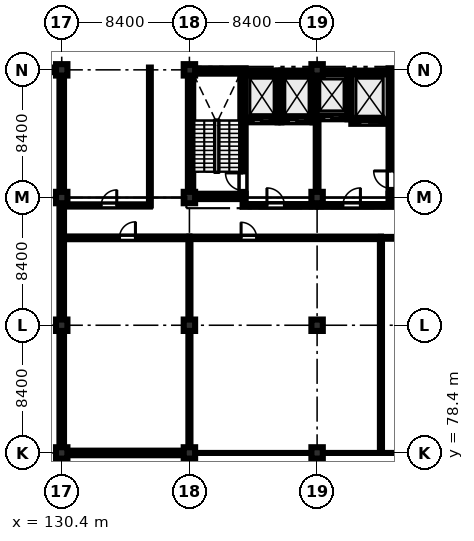
"""IFC4 building model, lengths in metres.
Left out: names, types, materials, properties, quantities, classifications, styles, units other than length and angle.
Written with IfcOpenShell. Run it as: python <this file> out.ifc"""

import sys

from ifc_helpers import new_model, si_unit, direction, frame, frame_2d, origin, origin_2d, place, context, subcontext, project, spatial, rectangle, extrude, element, fill, save


model = new_model("IFC4")
c1 = context("Model", 3, precision=1e-05, world=origin(), true_north=direction((0.0, 1.0)))
c2 = subcontext(c1, "Body", "Model", "MODEL_VIEW")
j1 = project(units=[si_unit("LENGTHUNIT", "METRE"), si_unit("PLANEANGLEUNIT", "RADIAN")], contexts=[c1])
p1 = place(None, origin())
s1 = spatial("IfcSite", under=j1, at=p1, CompositionType="ELEMENT")
p2 = place(p1, origin())
s2 = spatial("IfcBuilding", under=s1, at=p2, CompositionType="ELEMENT")
p3 = place(p2, frame((0.0, 0.0, 40.2)))
s3 = spatial("IfcBuildingStorey", under=s2, at=p3, CompositionType="ELEMENT", Elevation=40.2)
for number, where, z_axis, x_axis in (
    (1, (130.4, 78.4, 0.0), (0.0, 0.0, 1.0), (1.0, 0.0, 0.0)),
    (2, (130.4, 86.8, 0.0), (0.0, 0.0, 1.0), (1.0, 0.0, 0.0)),
    (3, (130.4, 95.2, 0.0), (0.0, 0.0, 1.0), (1.0, 0.0, 0.0)),
    (4, (130.4, 103.6, 0.0), (0.0, 0.0, 1.0), (1.0, 0.0, 0.0)),
    (5, (138.8, 78.4, 0.0), (0.0, 0.0, 1.0), (1.0, 0.0, 0.0)),
    (6, (138.8, 86.8, 0.0), (0.0, 0.0, 1.0), (1.0, 0.0, 0.0)),
    (7, (138.8, 95.2, 0.0), (0.0, 0.0, 1.0), (1.0, 0.0, 0.0)),
    (8, (138.8, 103.6, 0.0), (0.0, 0.0, 1.0), (1.0, 0.0, 0.0)),
    (9, (147.2, 78.4, 0.0), (0.0, 0.0, 1.0), (1.0, 0.0, 0.0)),
    (10, (147.2, 86.8, 0.0), (0.0, 0.0, 1.0), (1.0, 0.0, 0.0)),
    (11, (147.2, 95.2, 0.0), (0.0, 0.0, 1.0), (1.0, 0.0, 0.0)),
    (12, (147.2, 103.6, 0.0), (0.0, 0.0, 1.0), (1.0, 0.0, 0.0)),
):
    element("IfcColumn", number, at=place(p3, frame(where, z_axis=z_axis, x_axis=x_axis)), inside=s3, PredefinedType="COLUMN", context=c2, shape_type="SweptSolid", body=[
        extrude(rectangle(XDim=0.75, YDim=0.75, at=origin_2d()), origin(), (0.0, 0.0, 1.0), 4.0),
    ])
for number, where, z_axis, x_axis in (
    (13, (138.7, 95.275, 0.0), (0.0, 0.0, 1.0), (1.0, 0.0, 0.0)),
    (14, (138.7, 103.525, 0.0), (0.0, 0.0, 1.0), (1.0, 0.0, 0.0)),
):
    element("IfcWall", number, at=place(p3, frame(where, z_axis=z_axis, x_axis=x_axis)), inside=s3, PredefinedType="SHEAR", context=c2, shape_type="SweptSolid", body=[
        extrude(rectangle(XDim=3.8, YDim=0.35, at=frame_2d((1.9, 0.0))), origin(), (0.0, 0.0, 1.0), 4.0),
    ])
p4 = place(p3, frame((138.875, 95.45, 0.0), z_axis=(0.0, 0.0, 1.0), x_axis=(0.0, 1.0, 0.0)))
e15 = element("IfcWall", 15, at=p4, inside=s3, PredefinedType="SHEAR", context=c2, shape_type="SweptSolid", body=[
    extrude(rectangle(XDim=7.9, YDim=0.35, at=frame_2d((3.95, 0.0))), origin(), (0.0, 0.0, 1.0), 4.0),
])
p5 = place(p3, frame((142.325, 95.45, 0.0), z_axis=(0.0, 0.0, 1.0), x_axis=(0.0, 1.0, 0.0)))
e16 = element("IfcWall", 16, at=p5, inside=s3, PredefinedType="SHEAR", context=c2, shape_type="SweptSolid", body=[
    extrude(rectangle(XDim=7.9, YDim=0.35, at=frame_2d((3.95, 0.0))), origin(), (0.0, 0.0, 1.0), 4.0),
])
p6 = place(p5, frame((0.22, 0.0, 0.0)))
e17 = element("IfcOpeningElement", 17, at=p6, cuts=e16, PredefinedType="OPENING", context=c2, shape_type="SweptSolid", body=[
    extrude(rectangle(XDim=1.15, YDim=2.15, at=frame_2d((0.575, 1.075))), frame((0.0, 0.185, 0.0), z_axis=(0.0, -1.0, 0.0), x_axis=(1.0, 0.0, 0.0)), (0.0, 0.0, 1.0), 0.37),
])
for number, where, z_axis, x_axis in (
    (18, (151.9, 95.275, 0.0), (0.0, 0.0, 1.0), (1.0, 0.0, 0.0)),
    (19, (151.9, 103.525, 0.0), (0.0, 0.0, 1.0), (1.0, 0.0, 0.0)),
):
    element("IfcWall", number, at=place(p3, frame(where, z_axis=z_axis, x_axis=x_axis)), inside=s3, PredefinedType="SHEAR", context=c2, shape_type="SweptSolid", body=[
        extrude(rectangle(XDim=3.8, YDim=0.35, at=frame_2d((1.9, 0.0))), origin(), (0.0, 0.0, 1.0), 4.0),
    ])
p7 = place(p3, frame((152.075, 95.45, 0.0), z_axis=(0.0, 0.0, 1.0), x_axis=(0.0, 1.0, 0.0)))
e20 = element("IfcWall", 20, at=p7, inside=s3, PredefinedType="SHEAR", context=c2, shape_type="SweptSolid", body=[
    extrude(rectangle(XDim=7.9, YDim=0.35, at=frame_2d((3.95, 0.0))), origin(), (0.0, 0.0, 1.0), 4.0),
])
p8 = place(p7, frame((0.35, 0.0, 0.0)))
e21 = element("IfcOpeningElement", 21, at=p8, cuts=e20, PredefinedType="OPENING", context=c2, shape_type="SweptSolid", body=[
    extrude(rectangle(XDim=1.15, YDim=2.15, at=frame_2d((0.575, 1.075))), frame((0.0, 0.185, 0.0), z_axis=(0.0, -1.0, 0.0), x_axis=(1.0, 0.0, 0.0)), (0.0, 0.0, 1.0), 0.37),
])
p9 = place(p3, frame((142.5, 100.275, 0.0), z_axis=(0.0, 0.0, 1.0), x_axis=(1.0, 0.0, 0.0)))
e22 = element("IfcWall", 22, at=p9, inside=s3, PredefinedType="SHEAR", context=c2, shape_type="SweptSolid", body=[
    extrude(rectangle(XDim=2.1, YDim=0.25, at=frame_2d((1.05, 0.0))), origin(), (0.0, 0.0, 1.0), 4.0),
])
p10 = place(p9, frame((0.5, 0.0, 0.0)))
e23 = element("IfcOpeningElement", 23, at=p10, cuts=e22, PredefinedType="OPENING", context=c2, shape_type="SweptSolid", body=[
    extrude(rectangle(XDim=1.1, YDim=2.15, at=frame_2d((0.55, 1.075))), frame((0.0, 0.135, 0.0), z_axis=(0.0, -1.0, 0.0), x_axis=(1.0, 0.0, 0.0)), (0.0, 0.0, 1.0), 0.27),
])
p11 = place(p3, frame((142.5, 103.425, 0.0), z_axis=(0.0, 0.0, 1.0), x_axis=(1.0, 0.0, 0.0)))
e24 = element("IfcWall", 24, at=p11, inside=s3, PredefinedType="SHEAR", context=c2, shape_type="SweptSolid", body=[
    extrude(rectangle(XDim=2.1, YDim=0.25, at=frame_2d((1.05, 0.0))), origin(), (0.0, 0.0, 1.0), 4.0),
])
p12 = place(p3, frame((144.725, 100.15, 0.0), z_axis=(0.0, 0.0, 1.0), x_axis=(0.0, 1.0, 0.0)))
e25 = element("IfcWall", 25, at=p12, inside=s3, PredefinedType="SHEAR", context=c2, shape_type="SweptSolid", body=[
    extrude(rectangle(XDim=3.4, YDim=0.25, at=frame_2d((1.7, 0.0))), origin(), (0.0, 0.0, 1.0), 4.0),
])
p13 = place(p3, frame((144.85, 100.275, 0.0), z_axis=(0.0, 0.0, 1.0), x_axis=(1.0, 0.0, 0.0)))
e26 = element("IfcWall", 26, at=p13, inside=s3, PredefinedType="SHEAR", context=c2, shape_type="SweptSolid", body=[
    extrude(rectangle(XDim=2.05, YDim=0.25, at=frame_2d((1.025, 0.0))), origin(), (0.0, 0.0, 1.0), 4.0),
])
p14 = place(p13, frame((0.465, 0.0, 0.0)))
e27 = element("IfcOpeningElement", 27, at=p14, cuts=e26, PredefinedType="OPENING", context=c2, shape_type="SweptSolid", body=[
    extrude(rectangle(XDim=1.12, YDim=2.15, at=frame_2d((0.56, 1.075))), frame((0.0, 0.135, 0.0), z_axis=(0.0, -1.0, 0.0), x_axis=(1.0, 0.0, 0.0)), (0.0, 0.0, 1.0), 0.27),
])
p15 = place(p3, frame((144.85, 103.425, 0.0), z_axis=(0.0, 0.0, 1.0), x_axis=(1.0, 0.0, 0.0)))
e28 = element("IfcWall", 28, at=p15, inside=s3, PredefinedType="SHEAR", context=c2, shape_type="SweptSolid", body=[
    extrude(rectangle(XDim=2.05, YDim=0.25, at=frame_2d((1.025, 0.0))), origin(), (0.0, 0.0, 1.0), 4.0),
])
p16 = place(p3, frame((147.025, 100.15, 0.0), z_axis=(0.0, 0.0, 1.0), x_axis=(0.0, 1.0, 0.0)))
e29 = element("IfcWall", 29, at=p16, inside=s3, PredefinedType="SHEAR", context=c2, shape_type="SweptSolid", body=[
    extrude(rectangle(XDim=3.4, YDim=0.25, at=frame_2d((1.7, 0.0))), origin(), (0.0, 0.0, 1.0), 4.0),
])
p17 = place(p3, frame((147.15, 100.475, 0.0), z_axis=(0.0, 0.0, 1.0), x_axis=(1.0, 0.0, 0.0)))
e30 = element("IfcWall", 30, at=p17, inside=s3, PredefinedType="SHEAR", context=c2, shape_type="SweptSolid", body=[
    extrude(rectangle(XDim=2.05, YDim=0.25, at=frame_2d((1.025, 0.0))), origin(), (0.0, 0.0, 1.0), 4.0),
])
p18 = place(p17, frame((0.495, 0.0, 0.0)))
e31 = element("IfcOpeningElement", 31, at=p18, cuts=e30, PredefinedType="OPENING", context=c2, shape_type="SweptSolid", body=[
    extrude(rectangle(XDim=1.06, YDim=2.15, at=frame_2d((0.53, 1.075))), frame((0.0, 0.135, 0.0), z_axis=(0.0, -1.0, 0.0), x_axis=(1.0, 0.0, 0.0)), (0.0, 0.0, 1.0), 0.27),
])
p19 = place(p3, frame((147.15, 103.425, 0.0), z_axis=(0.0, 0.0, 1.0), x_axis=(1.0, 0.0, 0.0)))
e32 = element("IfcWall", 32, at=p19, inside=s3, PredefinedType="SHEAR", context=c2, shape_type="SweptSolid", body=[
    extrude(rectangle(XDim=2.05, YDim=0.25, at=frame_2d((1.025, 0.0))), origin(), (0.0, 0.0, 1.0), 4.0),
])
p20 = place(p3, frame((149.325, 100.35, 0.0), z_axis=(0.0, 0.0, 1.0), x_axis=(0.0, 1.0, 0.0)))
e33 = element("IfcWall", 33, at=p20, inside=s3, PredefinedType="SHEAR", context=c2, shape_type="SweptSolid", body=[
    extrude(rectangle(XDim=3.2, YDim=0.25, at=frame_2d((1.6, 0.0))), origin(), (0.0, 0.0, 1.0), 4.0),
])
p21 = place(p3, frame((149.45, 100.175, 0.0), z_axis=(0.0, 0.0, 1.0), x_axis=(1.0, 0.0, 0.0)))
e34 = element("IfcWall", 34, at=p21, inside=s3, PredefinedType="SHEAR", context=c2, shape_type="SweptSolid", body=[
    extrude(rectangle(XDim=2.45, YDim=0.25, at=frame_2d((1.225, 0.0))), origin(), (0.0, 0.0, 1.0), 4.0),
])
p22 = place(p21, frame((0.575, 0.0, 0.0)))
e35 = element("IfcOpeningElement", 35, at=p22, cuts=e34, PredefinedType="OPENING", context=c2, shape_type="SweptSolid", body=[
    extrude(rectangle(XDim=1.3, YDim=2.25, at=frame_2d((0.65, 1.125))), frame((0.0, 0.135, 0.0), z_axis=(0.0, -1.0, 0.0), x_axis=(1.0, 0.0, 0.0)), (0.0, 0.0, 1.0), 0.27),
])
p23 = place(p3, frame((149.45, 103.425, 0.0), z_axis=(0.0, 0.0, 1.0), x_axis=(1.0, 0.0, 0.0)))
e36 = element("IfcWall", 36, at=p23, inside=s3, PredefinedType="SHEAR", context=c2, shape_type="SweptSolid", body=[
    extrude(rectangle(XDim=2.45, YDim=0.25, at=frame_2d((1.225, 0.0))), origin(), (0.0, 0.0, 1.0), 4.0),
])
p24 = place(p3, frame((138.425, 78.4, 0.0), z_axis=(0.0, 0.0, 1.0), x_axis=(-1.0, 0.0, 0.0)))
e37 = element("IfcWall", 37, at=p24, inside=s3, PredefinedType="STANDARD", context=c2, shape_type="SweptSolid", body=[
    extrude(rectangle(XDim=7.65, YDim=0.3, at=frame_2d((3.825, 0.0))), origin(), (0.0, 0.0, 1.0), 4.0),
])
p25 = place(p24, frame((1.15, 0.0, 0.95)))
e38 = element("IfcOpeningElement", 38, at=p25, cuts=e37, PredefinedType="OPENING", context=c2, shape_type="SweptSolid", body=[
    extrude(rectangle(XDim=2.25, YDim=1.95, at=frame_2d((1.125, 0.975))), frame((0.0, 0.16, 0.0), z_axis=(0.0, -1.0, 0.0), x_axis=(1.0, 0.0, 0.0)), (0.0, 0.0, 1.0), 0.32),
])
p26 = place(p3, frame((130.4, 78.775, 0.0), z_axis=(0.0, 0.0, 1.0), x_axis=(0.0, 1.0, 0.0)))
e39 = element("IfcWall", 39, at=p26, inside=s3, PredefinedType="STANDARD", context=c2, shape_type="SweptSolid", body=[
    extrude(rectangle(XDim=7.65, YDim=0.3, at=frame_2d((3.825, 0.0))), origin(), (0.0, 0.0, 1.0), 4.0),
])
p27 = place(p26, frame((2.4, 0.0, 0.95)))
e40 = element("IfcOpeningElement", 40, at=p27, cuts=e39, PredefinedType="OPENING", context=c2, shape_type="SweptSolid", body=[
    extrude(rectangle(XDim=1.5, YDim=1.8, at=frame_2d((0.75, 0.9))), frame((0.0, 0.16, 0.0), z_axis=(0.0, -1.0, 0.0), x_axis=(1.0, 0.0, 0.0)), (0.0, 0.0, 1.0), 0.32),
])
p28 = place(p3, frame((130.4, 87.175, 0.0), z_axis=(0.0, 0.0, 1.0), x_axis=(0.0, 1.0, 0.0)))
e41 = element("IfcWall", 41, at=p28, inside=s3, PredefinedType="STANDARD", context=c2, shape_type="SweptSolid", body=[
    extrude(rectangle(XDim=7.65, YDim=0.3, at=frame_2d((3.825, 0.0))), origin(), (0.0, 0.0, 1.0), 3.3),
])
p29 = place(p28, frame((2.4, 0.0, 0.95)))
e42 = element("IfcOpeningElement", 42, at=p29, cuts=e41, PredefinedType="OPENING", context=c2, shape_type="SweptSolid", body=[
    extrude(rectangle(XDim=1.5, YDim=1.8, at=frame_2d((0.75, 0.9))), frame((0.0, 0.16, 0.0), z_axis=(0.0, -1.0, 0.0), x_axis=(1.0, 0.0, 0.0)), (0.0, 0.0, 1.0), 0.32),
])
p30 = place(p3, frame((130.4, 95.575, 0.0), z_axis=(0.0, 0.0, 1.0), x_axis=(0.0, 1.0, 0.0)))
e43 = element("IfcWall", 43, at=p30, inside=s3, PredefinedType="STANDARD", context=c2, shape_type="SweptSolid", body=[
    extrude(rectangle(XDim=7.65, YDim=0.3, at=frame_2d((3.825, 0.0))), origin(), (0.0, 0.0, 1.0), 3.3),
])
p31 = place(p30, frame((2.4, 0.0, 1.0)))
e44 = element("IfcOpeningElement", 44, at=p31, cuts=e43, PredefinedType="OPENING", context=c2, shape_type="SweptSolid", body=[
    extrude(rectangle(XDim=1.8, YDim=1.8, at=frame_2d((0.9, 0.9))), frame((0.0, 0.16, 0.0), z_axis=(0.0, -1.0, 0.0), x_axis=(1.0, 0.0, 0.0)), (0.0, 0.0, 1.0), 0.32),
])
p32 = place(p3, frame((130.025, 103.6, 0.0), z_axis=(0.0, 0.0, 1.0), x_axis=(-1.0, 0.0, 0.0)))
e45 = element("IfcWall", 45, at=p32, inside=s3, PredefinedType="STANDARD", context=c2, shape_type="SweptSolid", body=[
    extrude(rectangle(XDim=7.65, YDim=0.3, at=frame_2d((3.825, 0.0))), origin(), (0.0, 0.0, 1.0), 3.3),
])
p33 = place(p3, frame((142.3, 94.68, 0.0), z_axis=(0.0, 0.0, 1.0), x_axis=(1.0, 0.0, 0.0)))
e46 = element("IfcWall", 46, at=p33, inside=s3, PredefinedType="STANDARD", context=c2, shape_type="SweptSolid", body=[
    extrude(rectangle(XDim=4.8, YDim=0.18, at=frame_2d((2.4, 0.0))), origin(), (0.0, 0.0, 1.0), 4.0),
])
p34 = place(p33, frame((1.6, 0.0, 0.0)))
e47 = element("IfcOpeningElement", 47, at=p34, cuts=e46, PredefinedType="OPENING", context=c2, shape_type="SweptSolid", body=[
    extrude(rectangle(XDim=1.15, YDim=2.15, at=frame_2d((0.575, 1.075))), frame((0.0, 0.1, 0.0), z_axis=(0.0, -1.0, 0.0), x_axis=(1.0, 0.0, 0.0)), (0.0, 0.0, 1.0), 0.2),
])
p35 = place(p3, frame((147.3, 94.68, 0.0), z_axis=(0.0, 0.0, 1.0), x_axis=(1.0, 0.0, 0.0)))
e48 = element("IfcWall", 48, at=p35, inside=s3, PredefinedType="STANDARD", context=c2, shape_type="SweptSolid", body=[
    extrude(rectangle(XDim=4.85, YDim=0.18, at=frame_2d((2.425, 0.0))), origin(), (0.0, 0.0, 1.0), 4.0),
])
p36 = place(p35, frame((1.6, 0.0, 0.0)))
e49 = element("IfcOpeningElement", 49, at=p36, cuts=e48, PredefinedType="OPENING", context=c2, shape_type="SweptSolid", body=[
    extrude(rectangle(XDim=1.15, YDim=2.15, at=frame_2d((0.575, 1.075))), frame((0.0, 0.1, 0.0), z_axis=(0.0, -1.0, 0.0), x_axis=(1.0, 0.0, 0.0)), (0.0, 0.0, 1.0), 0.2),
])
p37 = place(p3, frame((147.2, 95.75, 0.0), z_axis=(0.0, 0.0, 1.0), x_axis=(0.0, 1.0, 0.0)))
e50 = element("IfcWall", 50, at=p37, inside=s3, PredefinedType="STANDARD", context=c2, shape_type="SweptSolid", body=[
    extrude(rectangle(XDim=4.5, YDim=0.18, at=frame_2d((2.25, 0.0))), origin(), (0.0, 0.0, 1.0), 3.3),
])
p38 = place(p3, frame((136.2, 94.68, 0.0), z_axis=(0.0, 0.0, 1.0), x_axis=(0.0, 1.0, 0.0)))
e51 = element("IfcWall", 51, at=p38, inside=s3, PredefinedType="PARTITIONING", context=c2, shape_type="SweptSolid", body=[
    extrude(rectangle(XDim=9.07, YDim=0.12, at=frame_2d((4.535, 0.0))), origin(), (0.0, 0.0, 1.0), 4.0),
])
p39 = place(p3, frame((130.8, 94.68, 0.0), z_axis=(0.0, 0.0, 1.0), x_axis=(1.0, 0.0, 0.0)))
e52 = element("IfcWall", 52, at=p39, inside=s3, PredefinedType="PARTITIONING", context=c2, shape_type="SweptSolid", body=[
    extrude(rectangle(XDim=5.4, YDim=0.145, at=frame_2d((2.7, 0.0))), origin(), (0.0, 0.0, 1.0), 4.0),
])
p40 = place(p39, frame((2.2, 0.0, 0.0)))
e53 = element("IfcOpeningElement", 53, at=p40, cuts=e52, PredefinedType="OPENING", context=c2, shape_type="SweptSolid", body=[
    extrude(rectangle(XDim=1.02, YDim=2.15, at=frame_2d((0.51, 1.075))), frame((0.0, 0.083, 0.0), z_axis=(0.0, -1.0, 0.0), x_axis=(1.0, 0.0, 0.0)), (0.0, 0.0, 1.0), 0.165),
])
p41 = place(p3, frame((130.55, 92.55, 0.0), z_axis=(0.0, 0.0, 1.0), x_axis=(1.0, 0.0, 0.0)))
e54 = element("IfcWall", 54, at=p41, inside=s3, PredefinedType="STANDARD", context=c2, shape_type="SweptSolid", body=[
    extrude(rectangle(XDim=8.25, YDim=0.18, at=frame_2d((4.125, 0.0))), origin(), (0.0, 0.0, 1.0), 4.0),
])
p42 = place(p41, frame((3.65, 0.0, 0.0)))
e55 = element("IfcOpeningElement", 55, at=p42, cuts=e54, PredefinedType="OPENING", context=c2, shape_type="SweptSolid", body=[
    extrude(rectangle(XDim=1.05, YDim=2.15, at=frame_2d((0.525, 1.075))), frame((0.0, 0.1, 0.0), z_axis=(0.0, -1.0, 0.0), x_axis=(1.0, 0.0, 0.0)), (0.0, 0.0, 1.0), 0.2),
])
p43 = place(p3, frame((138.8, 92.55, 0.0), z_axis=(0.0, 0.0, 1.0), x_axis=(1.0, 0.0, 0.0)))
e56 = element("IfcWall", 56, at=p43, inside=s3, PredefinedType="PARTITIONING", context=c2, shape_type="SweptSolid", body=[
    extrude(rectangle(XDim=12.6, YDim=0.165, at=frame_2d((6.3, 0.0))), origin(), (0.0, 0.0, 1.0), 4.0),
])
p44 = place(p43, frame((3.4, 0.0, 0.0)))
e57 = element("IfcOpeningElement", 57, at=p44, cuts=e56, PredefinedType="OPENING", context=c2, shape_type="SweptSolid", body=[
    extrude(rectangle(XDim=1.02, YDim=2.15, at=frame_2d((0.51, 1.075))), frame((0.0, 0.093, 0.0), z_axis=(0.0, -1.0, 0.0), x_axis=(1.0, 0.0, 0.0)), (0.0, 0.0, 1.0), 0.185),
])
p45 = place(p3, frame((138.8, 78.55, 0.0), z_axis=(0.0, 0.0, 1.0), x_axis=(0.0, 1.0, 0.0)))
e58 = element("IfcWall", 58, at=p45, inside=s3, PredefinedType="PARTITIONING", context=c2, shape_type="SweptSolid", body=[
    extrude(rectangle(XDim=14.0, YDim=0.135, at=frame_2d((7.0, 0.0))), origin(), (0.0, 0.0, 1.0), 3.3),
])
p46 = place(p3, frame((151.4, 92.55, 0.0), z_axis=(0.0, 0.0, 1.0), x_axis=(1.0, 0.0, 0.0)))
e59 = element("IfcWall", 59, at=p46, inside=s3, PredefinedType="PARTITIONING", context=c2, shape_type="SweptSolid", body=[
    extrude(rectangle(XDim=11.95, YDim=0.12, at=frame_2d((5.975, 0.0))), origin(), (0.0, 0.0, 1.0), 4.0),
])
p47 = place(p46, frame((6.8, 0.0, 0.0)))
e60 = element("IfcOpeningElement", 60, at=p47, cuts=e59, PredefinedType="OPENING", context=c2, shape_type="SweptSolid", body=[
    extrude(rectangle(XDim=1.1, YDim=2.18, at=frame_2d((0.55, 1.09))), frame((0.0, 0.07, 0.0), z_axis=(0.0, -1.0, 0.0), x_axis=(1.0, 0.0, 0.0)), (0.0, 0.0, 1.0), 0.14),
])
p48 = place(p3, frame((151.4, 78.55, 0.0), z_axis=(0.0, 0.0, 1.0), x_axis=(0.0, 1.0, 0.0)))
e61 = element("IfcWall", 61, at=p48, inside=s3, PredefinedType="PARTITIONING", context=c2, shape_type="SweptSolid", body=[
    extrude(rectangle(XDim=14.0, YDim=0.135, at=frame_2d((7.0, 0.0))), origin(), (0.0, 0.0, 1.0), 3.55),
])
p49 = place(p25, origin())
e62 = element("IfcWindow", 62, at=p49, inside=s3, PartitioningType="TRIPLE_PANEL_VERTICAL", PredefinedType="WINDOW", context=c2, shape_type="SweptSolid", body=[
    extrude(rectangle(XDim=2.25, YDim=1.95, at=frame_2d((1.125, 0.975))), frame((0.0, 0.03, 0.0), z_axis=(0.0, -1.0, 0.0), x_axis=(1.0, 0.0, 0.0)), (0.0, 0.0, 1.0), 0.06),
])
fill(e38, e62)
p50 = place(p27, origin())
e63 = element("IfcWindow", 63, at=p50, inside=s3, PartitioningType="DOUBLE_PANEL_VERTICAL", PredefinedType="WINDOW", context=c2, shape_type="SweptSolid", body=[
    extrude(rectangle(XDim=1.5, YDim=1.8, at=frame_2d((0.75, 0.9))), frame((0.0, 0.03, 0.0), z_axis=(0.0, -1.0, 0.0), x_axis=(1.0, 0.0, 0.0)), (0.0, 0.0, 1.0), 0.06),
])
fill(e40, e63)
p51 = place(p29, origin())
e64 = element("IfcWindow", 64, at=p51, inside=s3, PartitioningType="DOUBLE_PANEL_VERTICAL", PredefinedType="WINDOW", context=c2, shape_type="SweptSolid", body=[
    extrude(rectangle(XDim=1.5, YDim=1.8, at=frame_2d((0.75, 0.9))), frame((0.0, 0.03, 0.0), z_axis=(0.0, -1.0, 0.0), x_axis=(1.0, 0.0, 0.0)), (0.0, 0.0, 1.0), 0.06),
])
fill(e42, e64)
p52 = place(p31, origin())
e65 = element("IfcWindow", 65, at=p52, inside=s3, PartitioningType="DOUBLE_PANEL_VERTICAL", PredefinedType="WINDOW", context=c2, shape_type="SweptSolid", body=[
    extrude(rectangle(XDim=1.8, YDim=1.8, at=frame_2d((0.9, 0.9))), frame((0.0, 0.03, 0.0), z_axis=(0.0, -1.0, 0.0), x_axis=(1.0, 0.0, 0.0)), (0.0, 0.0, 1.0), 0.06),
])
fill(e44, e65)
p53 = place(p34, origin())
e66 = element("IfcDoor", 66, at=p53, inside=s3, OperationType="SINGLE_SWING_LEFT", PredefinedType="DOOR", context=c2, shape_type="SweptSolid", body=[
    extrude(rectangle(XDim=1.15, YDim=2.15, at=frame_2d((0.575, 1.075))), frame((0.0, 0.025, 0.0), z_axis=(0.0, -1.0, 0.0), x_axis=(1.0, 0.0, 0.0)), (0.0, 0.0, 1.0), 0.05),
])
fill(e47, e66)
p54 = place(p36, origin())
e67 = element("IfcDoor", 67, at=p54, inside=s3, OperationType="SINGLE_SWING_RIGHT", PredefinedType="DOOR", context=c2, shape_type="SweptSolid", body=[
    extrude(rectangle(XDim=1.15, YDim=2.15, at=frame_2d((0.575, 1.075))), frame((0.0, 0.025, 0.0), z_axis=(0.0, -1.0, 0.0), x_axis=(1.0, 0.0, 0.0)), (0.0, 0.0, 1.0), 0.05),
])
fill(e49, e67)
p55 = place(p40, origin())
e68 = element("IfcDoor", 68, at=p55, inside=s3, OperationType="SINGLE_SWING_RIGHT", PredefinedType="DOOR", context=c2, shape_type="SweptSolid", body=[
    extrude(rectangle(XDim=1.02, YDim=2.15, at=frame_2d((0.51, 1.075))), frame((0.0, 0.025, 0.0), z_axis=(0.0, -1.0, 0.0), x_axis=(1.0, 0.0, 0.0)), (0.0, 0.0, 1.0), 0.05),
])
fill(e53, e68)
p56 = place(p42, origin())
e69 = element("IfcDoor", 69, at=p56, inside=s3, OperationType="SINGLE_SWING_RIGHT", PredefinedType="DOOR", context=c2, shape_type="SweptSolid", body=[
    extrude(rectangle(XDim=1.05, YDim=2.15, at=frame_2d((0.525, 1.075))), frame((0.0, 0.025, 0.0), z_axis=(0.0, -1.0, 0.0), x_axis=(1.0, 0.0, 0.0)), (0.0, 0.0, 1.0), 0.05),
])
fill(e55, e69)
p57 = place(p44, origin())
e70 = element("IfcDoor", 70, at=p57, inside=s3, OperationType="SINGLE_SWING_LEFT", PredefinedType="DOOR", context=c2, shape_type="SweptSolid", body=[
    extrude(rectangle(XDim=1.02, YDim=2.15, at=frame_2d((0.51, 1.075))), frame((0.0, 0.025, 0.0), z_axis=(0.0, -1.0, 0.0), x_axis=(1.0, 0.0, 0.0)), (0.0, 0.0, 1.0), 0.05),
])
fill(e57, e70)
p58 = place(p6, origin())
e71 = element("IfcDoor", 71, at=p58, inside=s3, OperationType="SINGLE_SWING_RIGHT", PredefinedType="DOOR", context=c2, shape_type="SweptSolid", body=[
    extrude(rectangle(XDim=1.15, YDim=2.15, at=frame_2d((0.575, 1.075))), frame((0.0, 0.025, 0.0), z_axis=(0.0, -1.0, 0.0), x_axis=(1.0, 0.0, 0.0)), (0.0, 0.0, 1.0), 0.05),
])
fill(e17, e71)
p59 = place(p8, origin())
e72 = element("IfcDoor", 72, at=p59, inside=s3, OperationType="SINGLE_SWING_RIGHT", PredefinedType="DOOR", context=c2, shape_type="SweptSolid", body=[
    extrude(rectangle(XDim=1.15, YDim=2.15, at=frame_2d((0.575, 1.075))), frame((0.0, 0.025, 0.0), z_axis=(0.0, -1.0, 0.0), x_axis=(1.0, 0.0, 0.0)), (0.0, 0.0, 1.0), 0.05),
])
fill(e21, e72)
p60 = place(p10, origin())
e73 = element("IfcDoor", 73, at=p60, inside=s3, OperationType="SLIDING_TO_LEFT", PredefinedType="DOOR", context=c2, shape_type="SweptSolid", body=[
    extrude(rectangle(XDim=1.1, YDim=2.15, at=frame_2d((0.55, 1.075))), frame((0.0, 0.025, 0.0), z_axis=(0.0, -1.0, 0.0), x_axis=(1.0, 0.0, 0.0)), (0.0, 0.0, 1.0), 0.05),
])
fill(e23, e73)
p61 = place(p14, origin())
e74 = element("IfcDoor", 74, at=p61, inside=s3, OperationType="SLIDING_TO_LEFT", PredefinedType="DOOR", context=c2, shape_type="SweptSolid", body=[
    extrude(rectangle(XDim=1.12, YDim=2.15, at=frame_2d((0.56, 1.075))), frame((0.0, 0.025, 0.0), z_axis=(0.0, -1.0, 0.0), x_axis=(1.0, 0.0, 0.0)), (0.0, 0.0, 1.0), 0.05),
])
fill(e27, e74)
p62 = place(p18, origin())
e75 = element("IfcDoor", 75, at=p62, inside=s3, OperationType="SLIDING_TO_LEFT", PredefinedType="DOOR", context=c2, shape_type="SweptSolid", body=[
    extrude(rectangle(XDim=1.06, YDim=2.15, at=frame_2d((0.53, 1.075))), frame((0.0, 0.025, 0.0), z_axis=(0.0, -1.0, 0.0), x_axis=(1.0, 0.0, 0.0)), (0.0, 0.0, 1.0), 0.05),
])
fill(e31, e75)
p63 = place(p22, origin())
e76 = element("IfcDoor", 76, at=p63, inside=s3, OperationType="SLIDING_TO_LEFT", PredefinedType="DOOR", context=c2, shape_type="SweptSolid", body=[
    extrude(rectangle(XDim=1.3, YDim=2.25, at=frame_2d((0.65, 1.125))), frame((0.0, 0.025, 0.0), z_axis=(0.0, -1.0, 0.0), x_axis=(1.0, 0.0, 0.0)), (0.0, 0.0, 1.0), 0.05),
])
fill(e35, e76)
save(model, sys.argv[1])
